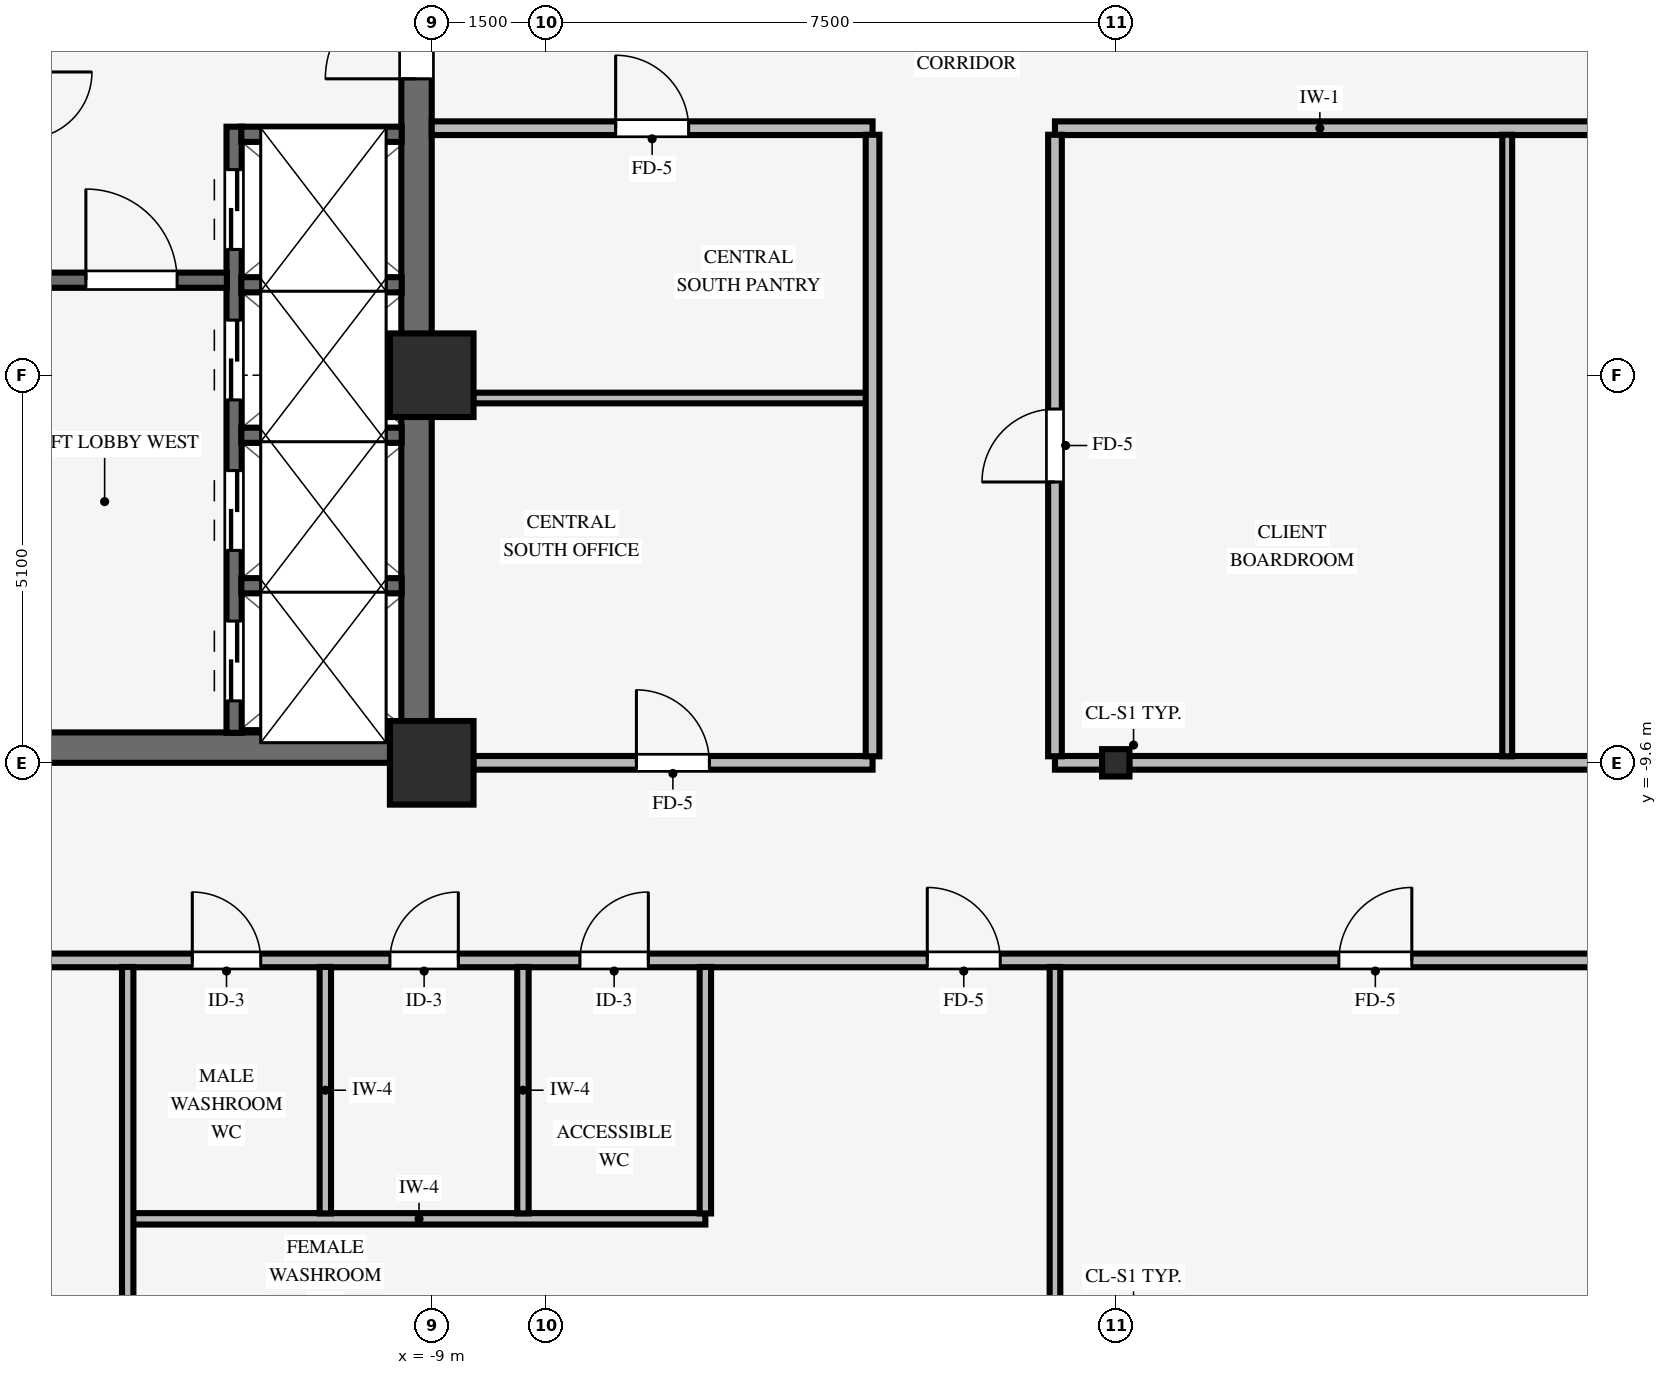
"""IFC4 building model, lengths in metres.
Left out: names, types, materials, properties, quantities, classifications, styles, units other than length and angle.
Written with IfcOpenShell. Run it as: python <this file> out.ifc"""

import sys

from ifc_helpers import new_model, si_unit, direction, frame, frame_2d, origin, origin_2d, place, context, subcontext, project, spatial, rectangle, i_section, extrude, source, transform, mapped, element, fill, save


model = new_model("IFC4")
c1 = context("Model", 3, precision=1e-05, world=origin(), true_north=direction((0.0, 1.0)))
c2 = subcontext(c1, "Body", "Model", "MODEL_VIEW")
j1 = project(units=[si_unit("LENGTHUNIT", "METRE"), si_unit("PLANEANGLEUNIT", "RADIAN")], contexts=[c1])
p1 = place(None, origin())
s1 = spatial("IfcSite", under=j1, at=p1, CompositionType="ELEMENT")
p2 = place(p1, origin())
s2 = spatial("IfcBuilding", under=s1, at=p2, CompositionType="ELEMENT")
p3 = place(p2, frame((0.0, 0.0, 109.25)))
s3 = spatial("IfcBuildingStorey", under=s2, at=p3, CompositionType="ELEMENT", Elevation=109.25)
p4 = place(p3, frame((-17.5, -9.4, 0.0), z_axis=(0.0, 0.0, 1.0), x_axis=(1.0, 0.0, 0.0)))
e1 = element("IfcWall", 1, at=p4, inside=s3, PredefinedType="SHEAR", context=c2, shape_type="SweptSolid", body=[
    extrude(rectangle(XDim=8.5, YDim=0.4, at=frame_2d((4.25, 0.0))), origin(), (0.0, 0.0, 1.0), 3.37),
])
p5 = place(p3, frame((-9.2, -9.205, 0.0), z_axis=(0.0, 0.0, 1.0), x_axis=(0.0, 1.0, 0.0)))
e2 = element("IfcWall", 2, at=p5, inside=s3, PredefinedType="SHEAR", context=c2, shape_type="SweptSolid", body=[
    extrude(rectangle(XDim=18.41, YDim=0.4, at=frame_2d((9.205, 0.0))), origin(), (0.0, 0.0, 1.0), 3.37),
])
p6 = place(p5, frame((8.605, 0.0, 0.0)))
e3 = element("IfcOpeningElement", 3, at=p6, cuts=e2, PredefinedType="OPENING", context=c2, shape_type="SweptSolid", body=[
    extrude(rectangle(XDim=1.2, YDim=2.15, at=frame_2d((0.6, 1.075))), frame((0.0, 0.21, 0.0), z_axis=(0.0, -1.0, 0.0), x_axis=(1.0, 0.0, 0.0)), (0.0, 0.0, 1.0), 0.42),
])
for number, where, z_axis, x_axis in (
    (4, (-9.0, -9.6, 0.0), (0.0, 0.0, 1.0), (1.0, 0.0, 0.0)),
    (5, (-9.0, -4.5, 0.0), (0.0, 0.0, 1.0), (1.0, 0.0, 0.0)),
):
    element("IfcColumn", number, at=place(p3, frame(where, z_axis=z_axis, x_axis=x_axis)), inside=s3, PredefinedType="COLUMN", context=c2, shape_type="SweptSolid", body=[
        extrude(rectangle(XDim=1.1, YDim=1.1, at=origin_2d()), origin(), (0.0, 0.0, 1.0), 3.37),
    ])
p7 = place(p3, frame((0.0, -9.6, 0.0), z_axis=(0.0, 0.0, 1.0), x_axis=(1.0, 0.0, 0.0)))
e6 = element("IfcColumn", 6, at=p7, inside=s3, PredefinedType="COLUMN", context=c2, shape_type="SweptSolid", body=[
    extrude(i_section(OverallWidth=0.36, OverallDepth=0.36, WebThickness=0.021, FlangeThickness=0.021, FilletRadius=0.018, at=origin_2d()), origin(), (0.0, 0.0, 1.0), 3.37),
])
p8 = place(p3, frame((-11.6, -9.205, 0.0), z_axis=(0.0, 0.0, 1.0), x_axis=(0.0, 1.0, 0.0)))
e7 = element("IfcWall", 7, at=p8, inside=s3, PredefinedType="SHEAR", context=c2, shape_type="SweptSolid", body=[
    extrude(rectangle(XDim=7.975, YDim=0.2, at=frame_2d((3.988, 0.0))), origin(), (0.0, 0.0, 1.0), 3.37),
])
p9 = place(p8, frame((0.42, 0.0, 0.0)))
e8 = element("IfcOpeningElement", 8, at=p9, cuts=e7, PredefinedType="OPENING", context=c2, shape_type="SweptSolid", body=[
    extrude(rectangle(XDim=1.05, YDim=2.15, at=frame_2d((0.525, 1.075))), frame((0.0, 0.11, 0.0), z_axis=(0.0, -1.0, 0.0), x_axis=(1.0, 0.0, 0.0)), (0.0, 0.0, 1.0), 0.22),
])
p10 = place(p8, frame((2.4, 0.0, 0.0)))
e9 = element("IfcOpeningElement", 9, at=p10, cuts=e7, PredefinedType="OPENING", context=c2, shape_type="SweptSolid", body=[
    extrude(rectangle(XDim=1.05, YDim=2.15, at=frame_2d((0.525, 1.075))), frame((0.0, 0.11, 0.0), z_axis=(0.0, -1.0, 0.0), x_axis=(1.0, 0.0, 0.0)), (0.0, 0.0, 1.0), 0.22),
])
p11 = place(p8, frame((4.38, 0.0, 0.0)))
e10 = element("IfcOpeningElement", 10, at=p11, cuts=e7, PredefinedType="OPENING", context=c2, shape_type="SweptSolid", body=[
    extrude(rectangle(XDim=1.05, YDim=2.15, at=frame_2d((0.525, 1.075))), frame((0.0, 0.11, 0.0), z_axis=(0.0, -1.0, 0.0), x_axis=(1.0, 0.0, 0.0)), (0.0, 0.0, 1.0), 0.22),
])
p12 = place(p8, frame((6.36, 0.0, 0.0)))
e11 = element("IfcOpeningElement", 11, at=p12, cuts=e7, PredefinedType="OPENING", context=c2, shape_type="SweptSolid", body=[
    extrude(rectangle(XDim=1.05, YDim=2.15, at=frame_2d((0.525, 1.075))), frame((0.0, 0.11, 0.0), z_axis=(0.0, -1.0, 0.0), x_axis=(1.0, 0.0, 0.0)), (0.0, 0.0, 1.0), 0.22),
])
p13 = place(p3, frame((-14.255, -3.25, 0.0), z_axis=(0.0, 0.0, 1.0), x_axis=(1.0, 0.0, 0.0)))
e12 = element("IfcWall", 12, at=p13, inside=s3, PredefinedType="SHEAR", context=c2, shape_type="SweptSolid", body=[
    extrude(rectangle(XDim=2.56, YDim=0.2, at=frame_2d((1.28, 0.0))), origin(), (0.0, 0.0, 1.0), 3.37),
])
p14 = place(p13, frame((0.705, 0.0, 0.0)))
e13 = element("IfcOpeningElement", 13, at=p14, cuts=e12, PredefinedType="OPENING", context=c2, shape_type="SweptSolid", body=[
    extrude(rectangle(XDim=1.2, YDim=2.15, at=frame_2d((0.6, 1.075))), frame((0.0, 0.11, 0.0), z_axis=(0.0, -1.0, 0.0), x_axis=(1.0, 0.0, 0.0)), (0.0, 0.0, 1.0), 0.22),
])
for number, where, z_axis, x_axis in (
    (14, (-11.505, -7.27, 0.0), (0.0, 0.0, 1.0), (1.0, 0.0, 0.0)),
    (15, (-11.505, -5.29, 0.0), (0.0, 0.0, 1.0), (1.0, 0.0, 0.0)),
    (16, (-11.505, -3.31, 0.0), (0.0, 0.0, 1.0), (1.0, 0.0, 0.0)),
    (17, (-11.505, -1.33, 0.0), (0.0, 0.0, 1.0), (1.0, 0.0, 0.0)),
):
    element("IfcWall", number, at=place(p3, frame(where, z_axis=z_axis, x_axis=x_axis)), inside=s3, PredefinedType="SHEAR", context=c2, shape_type="SweptSolid", body=[
        extrude(rectangle(XDim=2.11, YDim=0.2, at=frame_2d((1.055, 0.0))), origin(), (0.0, 0.0, 1.0), 3.37),
    ])
p15 = place(p3, frame((-12.934, -15.6, 0.0), z_axis=(0.0, 0.0, 1.0), x_axis=(1.0, 0.0, 0.0)))
e18 = element("IfcWall", 18, at=p15, inside=s3, PredefinedType="PARTITIONING", context=c2, shape_type="SweptSolid", body=[
    extrude(rectangle(XDim=7.534, YDim=0.15, at=frame_2d((3.767, 0.0))), origin(), (0.0, 0.0, 1.0), 3.36),
])
p16 = place(p3, frame((-15.0, -12.2, 0.0), z_axis=(0.0, 0.0, 1.0), x_axis=(1.0, 0.0, 0.0)))
e19 = element("IfcWall", 19, at=p16, inside=s3, PredefinedType="PARTITIONING", context=c2, shape_type="SweptSolid", body=[
    extrude(rectangle(XDim=30.0, YDim=0.18, at=frame_2d((15.0, 0.0))), origin(), (0.0, 0.0, 1.0), 3.36),
])
p17 = place(p16, frame((17.935, 0.0, 0.0)))
e20 = element("IfcOpeningElement", 20, at=p17, cuts=e19, PredefinedType="OPENING", context=c2, shape_type="SweptSolid", body=[
    extrude(rectangle(XDim=0.96, YDim=2.1, at=frame_2d((0.48, 1.05))), frame((0.0, 0.1, 0.0), z_axis=(0.0, -1.0, 0.0), x_axis=(1.0, 0.0, 0.0)), (0.0, 0.0, 1.0), 0.2),
])
p18 = place(p16, frame((25.835, 0.0, 0.0)))
e21 = element("IfcOpeningElement", 21, at=p18, cuts=e19, PredefinedType="OPENING", context=c2, shape_type="SweptSolid", body=[
    extrude(rectangle(XDim=0.96, YDim=2.1, at=frame_2d((0.48, 1.05))), frame((0.0, 0.1, 0.0), z_axis=(0.0, -1.0, 0.0), x_axis=(1.0, 0.0, 0.0)), (0.0, 0.0, 1.0), 0.2),
])
p19 = place(p16, frame((5.45, 0.0, 0.0)))
e22 = element("IfcOpeningElement", 22, at=p19, cuts=e19, PredefinedType="OPENING", context=c2, shape_type="SweptSolid", body=[
    extrude(rectangle(XDim=0.9, YDim=2.1, at=frame_2d((0.45, 1.05))), frame((0.0, 0.1, 0.0), z_axis=(0.0, -1.0, 0.0), x_axis=(1.0, 0.0, 0.0)), (0.0, 0.0, 1.0), 0.2),
])
p20 = place(p16, frame((2.85, 0.0, 0.0)))
e23 = element("IfcOpeningElement", 23, at=p20, cuts=e19, PredefinedType="OPENING", context=c2, shape_type="SweptSolid", body=[
    extrude(rectangle(XDim=0.9, YDim=2.1, at=frame_2d((0.45, 1.05))), frame((0.0, 0.1, 0.0), z_axis=(0.0, -1.0, 0.0), x_axis=(1.0, 0.0, 0.0)), (0.0, 0.0, 1.0), 0.2),
])
p21 = place(p16, frame((12.52, 0.0, 0.0)))
e24 = element("IfcOpeningElement", 24, at=p21, cuts=e19, PredefinedType="OPENING", context=c2, shape_type="SweptSolid", body=[
    extrude(rectangle(XDim=0.96, YDim=2.1, at=frame_2d((0.48, 1.05))), frame((0.0, 0.1, 0.0), z_axis=(0.0, -1.0, 0.0), x_axis=(1.0, 0.0, 0.0)), (0.0, 0.0, 1.0), 0.2),
])
p22 = place(p16, frame((7.95, 0.0, 0.0)))
e25 = element("IfcOpeningElement", 25, at=p22, cuts=e19, PredefinedType="OPENING", context=c2, shape_type="SweptSolid", body=[
    extrude(rectangle(XDim=0.9, YDim=2.1, at=frame_2d((0.45, 1.05))), frame((0.0, 0.1, 0.0), z_axis=(0.0, -1.0, 0.0), x_axis=(1.0, 0.0, 0.0)), (0.0, 0.0, 1.0), 0.2),
])
p23 = place(p3, frame((-8.454, -9.6, 0.0), z_axis=(0.0, 0.0, 1.0), x_axis=(1.0, 0.0, 0.0)))
e26 = element("IfcWall", 26, at=p23, inside=s3, PredefinedType="PARTITIONING", context=c2, shape_type="SweptSolid", body=[
    extrude(rectangle(XDim=5.254, YDim=0.18, at=frame_2d((2.627, 0.0))), origin(), (0.0, 0.0, 1.0), 2.405),
])
p24 = place(p23, frame((2.147, 0.0, 0.0)))
e27 = element("IfcOpeningElement", 27, at=p24, cuts=e26, PredefinedType="OPENING", context=c2, shape_type="SweptSolid", body=[
    extrude(rectangle(XDim=0.96, YDim=2.1, at=frame_2d((0.48, 1.05))), frame((0.0, 0.1, 0.0), z_axis=(0.0, -1.0, 0.0), x_axis=(1.0, 0.0, 0.0)), (0.0, 0.0, 1.0), 0.2),
])
p25 = place(p3, frame((-0.8, -9.6, 0.0), z_axis=(0.0, 0.0, 1.0), x_axis=(1.0, 0.0, 0.0)))
e28 = element("IfcWall", 28, at=p25, inside=s3, PredefinedType="PARTITIONING", context=c2, shape_type="SweptSolid", body=[
    extrude(rectangle(XDim=0.624, YDim=0.18, at=frame_2d((0.312, 0.0))), origin(), (0.0, 0.0, 1.0), 2.405),
])
p26 = place(p3, frame((0.176, -9.6, 0.0), z_axis=(0.0, 0.0, 1.0), x_axis=(1.0, 0.0, 0.0)))
e29 = element("IfcWall", 29, at=p26, inside=s3, PredefinedType="PARTITIONING", context=c2, shape_type="SweptSolid", body=[
    extrude(rectangle(XDim=8.278, YDim=0.18, at=frame_2d((4.139, 0.0))), origin(), (0.0, 0.0, 1.0), 2.405),
])
p27 = place(p3, frame((-8.454, -4.8, 0.0), z_axis=(0.0, 0.0, 1.0), x_axis=(1.0, 0.0, 0.0)))
e30 = element("IfcWall", 30, at=p27, inside=s3, PredefinedType="PARTITIONING", context=c2, shape_type="SweptSolid", body=[
    extrude(rectangle(XDim=5.168, YDim=0.14, at=frame_2d((2.584, 0.0))), origin(), (0.0, 0.0, 1.0), 2.738),
])
p28 = place(p3, frame((-9.0, -1.25, 0.0), z_axis=(0.0, 0.0, 1.0), x_axis=(1.0, 0.0, 0.0)))
e31 = element("IfcWall", 31, at=p28, inside=s3, PredefinedType="PARTITIONING", context=c2, shape_type="SweptSolid", body=[
    extrude(rectangle(XDim=5.8, YDim=0.18, at=frame_2d((2.9, 0.0))), origin(), (0.0, 0.0, 1.0), 3.36),
])
p29 = place(p28, frame((2.42, 0.0, 0.0)))
e32 = element("IfcOpeningElement", 32, at=p29, cuts=e31, PredefinedType="OPENING", context=c2, shape_type="SweptSolid", body=[
    extrude(rectangle(XDim=0.96, YDim=2.1, at=frame_2d((0.48, 1.05))), frame((0.0, 0.1, 0.0), z_axis=(0.0, -1.0, 0.0), x_axis=(1.0, 0.0, 0.0)), (0.0, 0.0, 1.0), 0.2),
])
p30 = place(p3, frame((-0.8, -1.25, 0.0), z_axis=(0.0, 0.0, 1.0), x_axis=(1.0, 0.0, 0.0)))
e33 = element("IfcWall", 33, at=p30, inside=s3, PredefinedType="PARTITIONING", context=c2, shape_type="SweptSolid", body=[
    extrude(rectangle(XDim=9.8, YDim=0.18, at=frame_2d((4.9, 0.0))), origin(), (0.0, 0.0, 1.0), 3.36),
])
p31 = place(p30, frame((7.42, 0.0, 0.0)))
e34 = element("IfcOpeningElement", 34, at=p31, cuts=e33, PredefinedType="OPENING", context=c2, shape_type="SweptSolid", body=[
    extrude(rectangle(XDim=0.96, YDim=2.1, at=frame_2d((0.48, 1.05))), frame((0.0, 0.1, 0.0), z_axis=(0.0, -1.0, 0.0), x_axis=(1.0, 0.0, 0.0)), (0.0, 0.0, 1.0), 0.2),
])
p32 = place(p3, frame((-13.0, -22.88, 0.0), z_axis=(0.0, 0.0, 1.0), x_axis=(0.0, 1.0, 0.0)))
e35 = element("IfcWall", 35, at=p32, inside=s3, PredefinedType="PARTITIONING", context=c2, shape_type="SweptSolid", body=[
    extrude(rectangle(XDim=10.594, YDim=0.15, at=frame_2d((5.297, 0.0))), origin(), (0.0, 0.0, 1.0), 3.36),
])
for number, where, z_axis, x_axis in (
    (36, (-10.4, -15.529, 0.0), (0.0, 0.0, 1.0), (0.0, 1.0, 0.0)),
    (37, (-7.8, -15.529, 0.0), (0.0, 0.0, 1.0), (0.0, 1.0, 0.0)),
    (38, (-5.4, -15.529, 0.0), (0.0, 0.0, 1.0), (0.0, 1.0, 0.0)),
):
    element("IfcWall", number, at=place(p3, frame(where, z_axis=z_axis, x_axis=x_axis)), inside=s3, PredefinedType="PARTITIONING", context=c2, shape_type="SweptSolid", body=[
        extrude(rectangle(XDim=3.243, YDim=0.15, at=frame_2d((1.622, 0.0))), origin(), (0.0, 0.0, 1.0), 3.36),
    ])
p33 = place(p3, frame((-3.2, -9.514, 0.0), z_axis=(0.0, 0.0, 1.0), x_axis=(0.0, 1.0, 0.0)))
e39 = element("IfcWall", 39, at=p33, inside=s3, PredefinedType="PARTITIONING", context=c2, shape_type="SweptSolid", body=[
    extrude(rectangle(XDim=8.178, YDim=0.18, at=frame_2d((4.089, 0.0))), origin(), (0.0, 0.0, 1.0), 3.36),
])
p34 = place(p3, frame((-0.8, -22.88, 0.0), z_axis=(0.0, 0.0, 1.0), x_axis=(0.0, 1.0, 0.0)))
e40 = element("IfcWall", 40, at=p34, inside=s3, PredefinedType="PARTITIONING", context=c2, shape_type="SweptSolid", body=[
    extrude(rectangle(XDim=10.594, YDim=0.14, at=frame_2d((5.297, 0.0))), origin(), (0.0, 0.0, 1.0), 3.36),
])
p35 = place(p3, frame((-0.8, -9.514, 0.0), z_axis=(0.0, 0.0, 1.0), x_axis=(0.0, 1.0, 0.0)))
e41 = element("IfcWall", 41, at=p35, inside=s3, PredefinedType="PARTITIONING", context=c2, shape_type="SweptSolid", body=[
    extrude(rectangle(XDim=8.178, YDim=0.18, at=frame_2d((4.089, 0.0))), origin(), (0.0, 0.0, 1.0), 3.36),
])
p36 = place(p35, frame((3.609, 0.0, 0.0)))
e42 = element("IfcOpeningElement", 42, at=p36, cuts=e41, PredefinedType="OPENING", context=c2, shape_type="SweptSolid", body=[
    extrude(rectangle(XDim=0.96, YDim=2.1, at=frame_2d((0.48, 1.05))), frame((0.0, 0.1, 0.0), z_axis=(0.0, -1.0, 0.0), x_axis=(1.0, 0.0, 0.0)), (0.0, 0.0, 1.0), 0.2),
])
p37 = place(p3, frame((5.15, -9.514, 0.0), z_axis=(0.0, 0.0, 1.0), x_axis=(0.0, 1.0, 0.0)))
e43 = element("IfcWall", 43, at=p37, inside=s3, PredefinedType="PARTITIONING", context=c2, shape_type="SweptSolid", body=[
    extrude(rectangle(XDim=8.178, YDim=0.13, at=frame_2d((4.089, 0.0))), origin(), (0.0, 0.0, 1.0), 3.36),
])
m1 = source(origin(), c2, "Body", "SweptSolid", [
    extrude(rectangle(XDim=1.2, YDim=2.15, at=frame_2d((0.6, 1.075))), frame((0.0, 0.025, 0.0), z_axis=(0.0, -1.0, 0.0), x_axis=(1.0, 0.0, 0.0)), (0.0, 0.0, 1.0), 0.05),
])
p38 = place(p14, origin())
e44 = element("IfcDoor", 44, at=p38, inside=s3, OperationType="SINGLE_SWING_LEFT", PredefinedType="DOOR", context=c2, shape_type="MappedRepresentation", body=[
    mapped(m1, transform((0.0, 0.0, 0.0), scale=1.0)),
])
fill(e13, e44)
p39 = place(p6, origin())
e45 = element("IfcDoor", 45, at=p39, inside=s3, OperationType="SINGLE_SWING_LEFT", PredefinedType="DOOR", context=c2, shape_type="MappedRepresentation", body=[
    mapped(m1, transform((0.0, 0.0, 0.0), scale=1.0)),
])
fill(e3, e45)
m2 = source(origin(), c2, "Body", "SweptSolid", [
    extrude(rectangle(XDim=1.05, YDim=2.15, at=frame_2d((0.525, 1.075))), frame((0.0, 0.025, 0.0), z_axis=(0.0, -1.0, 0.0), x_axis=(1.0, 0.0, 0.0)), (0.0, 0.0, 1.0), 0.05),
])
p40 = place(p9, origin())
e46 = element("IfcDoor", 46, at=p40, inside=s3, OperationType="DOUBLE_DOOR_SLIDING", PredefinedType="DOOR", context=c2, shape_type="MappedRepresentation", body=[
    mapped(m2, transform((0.0, 0.0, 0.0), scale=1.0)),
])
fill(e8, e46)
p41 = place(p10, origin())
e47 = element("IfcDoor", 47, at=p41, inside=s3, OperationType="DOUBLE_DOOR_SLIDING", PredefinedType="DOOR", context=c2, shape_type="MappedRepresentation", body=[
    mapped(m2, transform((0.0, 0.0, 0.0), scale=1.0)),
])
fill(e9, e47)
p42 = place(p11, origin())
e48 = element("IfcDoor", 48, at=p42, inside=s3, OperationType="DOUBLE_DOOR_SLIDING", PredefinedType="DOOR", context=c2, shape_type="MappedRepresentation", body=[
    mapped(m2, transform((0.0, 0.0, 0.0), scale=1.0)),
])
fill(e10, e48)
p43 = place(p12, origin())
e49 = element("IfcDoor", 49, at=p43, inside=s3, OperationType="DOUBLE_DOOR_SLIDING", PredefinedType="DOOR", context=c2, shape_type="MappedRepresentation", body=[
    mapped(m2, transform((0.0, 0.0, 0.0), scale=1.0)),
])
fill(e11, e49)
m3 = source(origin(), c2, "Body", "SweptSolid", [
    extrude(rectangle(XDim=0.96, YDim=2.1, at=frame_2d((0.48, 1.05))), frame((0.0, 0.025, 0.0), z_axis=(0.0, -1.0, 0.0), x_axis=(1.0, 0.0, 0.0)), (0.0, 0.0, 1.0), 0.05),
])
p44 = place(p17, origin())
e50 = element("IfcDoor", 50, at=p44, inside=s3, OperationType="SINGLE_SWING_RIGHT", PredefinedType="DOOR", context=c2, shape_type="MappedRepresentation", body=[
    mapped(m3, transform((0.0, 0.0, 0.0), scale=1.0)),
])
fill(e20, e50)
p45 = place(p36, origin())
e51 = element("IfcDoor", 51, at=p45, inside=s3, OperationType="SINGLE_SWING_LEFT", PredefinedType="DOOR", context=c2, shape_type="MappedRepresentation", body=[
    mapped(m3, transform((0.0, 0.0, 0.0), scale=1.0)),
])
fill(e42, e51)
p46 = place(p29, origin())
e52 = element("IfcDoor", 52, at=p46, inside=s3, OperationType="SINGLE_SWING_LEFT", PredefinedType="DOOR", context=c2, shape_type="MappedRepresentation", body=[
    mapped(m3, transform((0.0, 0.0, 0.0), scale=1.0)),
])
fill(e32, e52)
p47 = place(p24, origin())
e53 = element("IfcDoor", 53, at=p47, inside=s3, OperationType="SINGLE_SWING_LEFT", PredefinedType="DOOR", context=c2, shape_type="MappedRepresentation", body=[
    mapped(m3, transform((0.0, 0.0, 0.0), scale=1.0)),
])
fill(e27, e53)
m4 = source(origin(), c2, "Body", "SweptSolid", [
    extrude(rectangle(XDim=0.9, YDim=2.1, at=frame_2d((0.45, 1.05))), frame((0.0, 0.025, 0.0), z_axis=(0.0, -1.0, 0.0), x_axis=(1.0, 0.0, 0.0)), (0.0, 0.0, 1.0), 0.05),
])
p48 = place(p19, origin())
e54 = element("IfcDoor", 54, at=p48, inside=s3, OperationType="SINGLE_SWING_RIGHT", PredefinedType="DOOR", context=c2, shape_type="MappedRepresentation", body=[
    mapped(m4, transform((0.0, 0.0, 0.0), scale=1.0)),
])
fill(e22, e54)
p49 = place(p20, origin())
e55 = element("IfcDoor", 55, at=p49, inside=s3, OperationType="SINGLE_SWING_LEFT", PredefinedType="DOOR", context=c2, shape_type="MappedRepresentation", body=[
    mapped(m4, transform((0.0, 0.0, 0.0), scale=1.0)),
])
fill(e23, e55)
p50 = place(p21, origin())
e56 = element("IfcDoor", 56, at=p50, inside=s3, OperationType="SINGLE_SWING_LEFT", PredefinedType="DOOR", context=c2, shape_type="MappedRepresentation", body=[
    mapped(m3, transform((0.0, 0.0, 0.0), scale=1.0)),
])
fill(e24, e56)
p51 = place(p22, origin())
e57 = element("IfcDoor", 57, at=p51, inside=s3, OperationType="SINGLE_SWING_RIGHT", PredefinedType="DOOR", context=c2, shape_type="MappedRepresentation", body=[
    mapped(m4, transform((0.0, 0.0, 0.0), scale=1.0)),
])
fill(e25, e57)
save(model, sys.argv[1])
